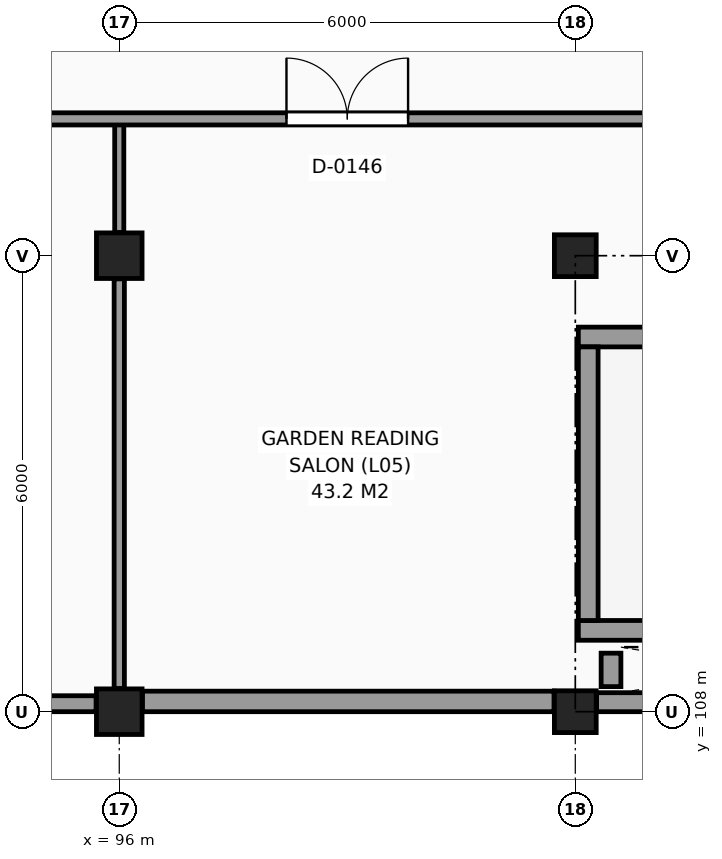
"""IFC4 building model, lengths in metres.
Left out: names, types, materials, properties, quantities, classifications, styles, units other than length and angle.
Written with IfcOpenShell. Run it as: python <this file> out.ifc"""

import sys

from ifc_helpers import new_model, si_unit, direction, frame, frame_2d, origin, origin_2d, place, context, subcontext, project, spatial, rectangle, extrude, element, fill, save


model = new_model("IFC4")
c1 = context("Model", 3, precision=1e-05, world=origin(), true_north=direction((0.0, 1.0)))
c2 = subcontext(c1, "Body", "Model", "MODEL_VIEW")
j1 = project(units=[si_unit("LENGTHUNIT", "METRE"), si_unit("PLANEANGLEUNIT", "RADIAN")], contexts=[c1])
p1 = place(None, origin())
s1 = spatial("IfcSite", under=j1, at=p1, CompositionType="ELEMENT")
p2 = place(p1, origin())
s2 = spatial("IfcBuilding", under=s1, at=p2, CompositionType="ELEMENT")
p3 = place(p2, frame((0.0, 0.0, 24.6)))
s3 = spatial("IfcBuildingStorey", under=s2, at=p3, CompositionType="ELEMENT", Elevation=24.6)
for number, where, z_axis, x_axis in (
    (1, (96.0, 108.0, 0.0), (0.0, 0.0, 1.0), (1.0, 0.0, 0.0)),
    (2, (96.0, 114.0, 0.0), (0.0, 0.0, 1.0), (1.0, 0.0, 0.0)),
):
    element("IfcColumn", number, at=place(p3, frame(where, z_axis=z_axis, x_axis=x_axis)), inside=s3, PredefinedType="COLUMN", context=c2, shape_type="SweptSolid", body=[
        extrude(rectangle(XDim=0.6, YDim=0.6, at=origin_2d()), origin(), (0.0, 0.0, 1.0), 3.6),
    ])
for number, where, z_axis, x_axis in (
    (3, (102.0, 108.0, 0.0), (0.0, 0.0, 1.0), (1.0, 0.0, 0.0)),
    (4, (102.0, 114.0, 0.0), (0.0, 0.0, 1.0), (1.0, 0.0, 0.0)),
):
    element("IfcColumn", number, at=place(p3, frame(where, z_axis=z_axis, x_axis=x_axis)), inside=s3, PredefinedType="COLUMN", context=c2, shape_type="SweptSolid", body=[
        extrude(rectangle(XDim=0.55, YDim=0.55, at=origin_2d()), origin(), (0.0, 0.0, 1.0), 3.6),
    ])
p4 = place(p3, frame((90.28, 108.105, 0.0), z_axis=(0.0, 0.0, 1.0), x_axis=(1.0, 0.0, 0.0)))
e5 = element("IfcWall", 5, at=p4, inside=s3, PredefinedType="SOLIDWALL", context=c2, shape_type="SweptSolid", body=[
    extrude(rectangle(XDim=5.415, YDim=0.21, at=frame_2d((2.708, 0.0))), origin(), (0.0, 0.0, 1.0), 2.73),
])
p5 = place(p3, frame((96.305, 108.135, 0.0), z_axis=(0.0, 0.0, 1.0), x_axis=(1.0, 0.0, 0.0)))
e6 = element("IfcWall", 6, at=p5, inside=s3, PredefinedType="SOLIDWALL", context=c2, shape_type="SweptSolid", body=[
    extrude(rectangle(XDim=5.415, YDim=0.27, at=frame_2d((2.708, 0.0))), origin(), (0.0, 0.0, 1.0), 2.73),
])
p6 = place(p3, frame((102.28, 108.125, 0.0), z_axis=(0.0, 0.0, 1.0), x_axis=(1.0, 0.0, 0.0)))
e7 = element("IfcWall", 7, at=p6, inside=s3, PredefinedType="SOLIDWALL", context=c2, shape_type="SweptSolid", body=[
    extrude(rectangle(XDim=5.415, YDim=0.25, at=frame_2d((2.708, 0.0))), origin(), (0.0, 0.0, 1.0), 3.38),
])
for number, where, z_axis, x_axis in (
    (8, (102.04, 109.07, 0.0), (0.0, 0.0, 1.0), (1.0, 0.0, 0.0)),
    (9, (102.04, 112.93, 0.0), (0.0, 0.0, 1.0), (1.0, 0.0, 0.0)),
):
    element("IfcWall", number, at=place(p3, frame(where, z_axis=z_axis, x_axis=x_axis)), inside=s3, PredefinedType="SHEAR", context=c2, shape_type="SweptSolid", body=[
        extrude(rectangle(XDim=10.72, YDim=0.26, at=frame_2d((5.36, 0.0))), origin(), (0.0, 0.0, 1.0), 3.6),
    ])
p7 = place(p3, frame((102.17, 109.2, 0.0), z_axis=(0.0, 0.0, 1.0), x_axis=(0.0, 1.0, 0.0)))
e10 = element("IfcWall", 10, at=p7, inside=s3, PredefinedType="SHEAR", context=c2, shape_type="SweptSolid", body=[
    extrude(rectangle(XDim=3.6, YDim=0.26, at=frame_2d((1.8, 0.0))), origin(), (0.0, 0.0, 1.0), 3.6),
])
p8 = place(p3, frame((102.47, 108.33, 0.0), z_axis=(0.0, 0.0, 1.0), x_axis=(0.0, 1.0, 0.0)))
e11 = element("IfcWall", 11, at=p8, inside=s3, PredefinedType="SHEAR", context=c2, shape_type="SweptSolid", body=[
    extrude(rectangle(XDim=0.44, YDim=0.26, at=frame_2d((0.22, 0.0))), origin(), (0.0, 0.0, 1.0), 3.6),
])
p9 = place(p3, frame((96.0, 108.305, 0.0), z_axis=(0.0, 0.0, 1.0), x_axis=(0.0, 1.0, 0.0)))
e12 = element("IfcWall", 12, at=p9, inside=s3, PredefinedType="PARTITIONING", context=c2, shape_type="SweptSolid", body=[
    extrude(rectangle(XDim=5.39, YDim=0.135, at=frame_2d((2.695, 0.0))), origin(), (0.0, 0.0, 1.0), 2.58),
])
p10 = place(p3, frame((96.0, 114.305, 0.0), z_axis=(0.0, 0.0, 1.0), x_axis=(0.0, 1.0, 0.0)))
e13 = element("IfcWall", 13, at=p10, inside=s3, PredefinedType="PARTITIONING", context=c2, shape_type="SweptSolid", body=[
    extrude(rectangle(XDim=1.495, YDim=0.12, at=frame_2d((0.748, 0.0))), origin(), (0.0, 0.0, 1.0), 2.58),
])
p11 = place(p3, frame((66.255, 115.8, 0.0), z_axis=(0.0, 0.0, 1.0), x_axis=(1.0, 0.0, 0.0)))
e14 = element("IfcWall", 14, at=p11, inside=s3, PredefinedType="PARTITIONING", context=c2, shape_type="SweptSolid", body=[
    extrude(rectangle(XDim=103.545, YDim=0.16, at=frame_2d((51.772, 0.0))), origin(), (0.0, 0.0, 1.0), 3.38),
])
p12 = place(p11, frame((80.145, 0.0, 0.0)))
e15 = element("IfcOpeningElement", 15, at=p12, cuts=e14, PredefinedType="OPENING", context=c2, shape_type="SweptSolid", body=[
    extrude(rectangle(XDim=1.2, YDim=2.2, at=frame_2d((0.6, 1.1))), frame((0.0, 0.09, 0.0), z_axis=(0.0, -1.0, 0.0), x_axis=(1.0, 0.0, 0.0)), (0.0, 0.0, 1.0), 0.18),
])
p13 = place(p11, frame((50.145, 0.0, 0.0)))
e16 = element("IfcOpeningElement", 16, at=p13, cuts=e14, PredefinedType="OPENING", context=c2, shape_type="SweptSolid", body=[
    extrude(rectangle(XDim=1.2, YDim=2.2, at=frame_2d((0.6, 1.1))), frame((0.0, 0.09, 0.0), z_axis=(0.0, -1.0, 0.0), x_axis=(1.0, 0.0, 0.0)), (0.0, 0.0, 1.0), 0.18),
])
p14 = place(p11, frame((8.995, 0.0, 0.0)))
e17 = element("IfcOpeningElement", 17, at=p14, cuts=e14, PredefinedType="OPENING", context=c2, shape_type="SweptSolid", body=[
    extrude(rectangle(XDim=1.1, YDim=2.15, at=frame_2d((0.55, 1.075))), frame((0.0, 0.09, 0.0), z_axis=(0.0, -1.0, 0.0), x_axis=(1.0, 0.0, 0.0)), (0.0, 0.0, 1.0), 0.18),
])
p15 = place(p11, frame((55.295, 0.0, 0.0)))
e18 = element("IfcOpeningElement", 18, at=p15, cuts=e14, PredefinedType="OPENING", context=c2, shape_type="SweptSolid", body=[
    extrude(rectangle(XDim=1.0, YDim=2.15, at=frame_2d((0.5, 1.075))), frame((0.0, 0.09, 0.0), z_axis=(0.0, -1.0, 0.0), x_axis=(1.0, 0.0, 0.0)), (0.0, 0.0, 1.0), 0.18),
])
p16 = place(p11, frame((62.265, 0.0, 0.0)))
e19 = element("IfcOpeningElement", 19, at=p16, cuts=e14, PredefinedType="OPENING", context=c2, shape_type="SweptSolid", body=[
    extrude(rectangle(XDim=0.96, YDim=2.15, at=frame_2d((0.48, 1.075))), frame((0.0, 0.09, 0.0), z_axis=(0.0, -1.0, 0.0), x_axis=(1.0, 0.0, 0.0)), (0.0, 0.0, 1.0), 0.18),
])
p17 = place(p11, frame((31.945, 0.0, 0.0)))
e20 = element("IfcOpeningElement", 20, at=p17, cuts=e14, PredefinedType="OPENING", context=c2, shape_type="SweptSolid", body=[
    extrude(rectangle(XDim=1.6, YDim=2.25, at=frame_2d((0.8, 1.125))), frame((0.0, 0.09, 0.0), z_axis=(0.0, -1.0, 0.0), x_axis=(1.0, 0.0, 0.0)), (0.0, 0.0, 1.0), 0.18),
])
p18 = place(p11, frame((18.57, 0.0, 0.0)))
e21 = element("IfcOpeningElement", 21, at=p18, cuts=e14, PredefinedType="OPENING", context=c2, shape_type="SweptSolid", body=[
    extrude(rectangle(XDim=0.95, YDim=2.1, at=frame_2d((0.475, 1.05))), frame((0.0, 0.09, 0.0), z_axis=(0.0, -1.0, 0.0), x_axis=(1.0, 0.0, 0.0)), (0.0, 0.0, 1.0), 0.18),
])
p19 = place(p11, frame((24.57, 0.0, 0.0)))
e22 = element("IfcOpeningElement", 22, at=p19, cuts=e14, PredefinedType="OPENING", context=c2, shape_type="SweptSolid", body=[
    extrude(rectangle(XDim=0.95, YDim=2.1, at=frame_2d((0.475, 1.05))), frame((0.0, 0.09, 0.0), z_axis=(0.0, -1.0, 0.0), x_axis=(1.0, 0.0, 0.0)), (0.0, 0.0, 1.0), 0.18),
])
p20 = place(p11, frame((84.47, 0.0, 0.0)))
e23 = element("IfcOpeningElement", 23, at=p20, cuts=e14, PredefinedType="OPENING", context=c2, shape_type="SweptSolid", body=[
    extrude(rectangle(XDim=0.95, YDim=2.1, at=frame_2d((0.475, 1.05))), frame((0.0, 0.09, 0.0), z_axis=(0.0, -1.0, 0.0), x_axis=(1.0, 0.0, 0.0)), (0.0, 0.0, 1.0), 0.18),
])
p21 = place(p17, origin())
e24 = element("IfcDoor", 24, at=p21, inside=s3, OperationType="DOUBLE_DOOR_SINGLE_SWING", PredefinedType="DOOR", context=c2, shape_type="SweptSolid", body=[
    extrude(rectangle(XDim=1.6, YDim=2.25, at=frame_2d((0.8, 1.125))), frame((0.0, 0.025, 0.0), z_axis=(0.0, -1.0, 0.0), x_axis=(1.0, 0.0, 0.0)), (0.0, 0.0, 1.0), 0.05),
])
fill(e20, e24)
save(model, sys.argv[1])
